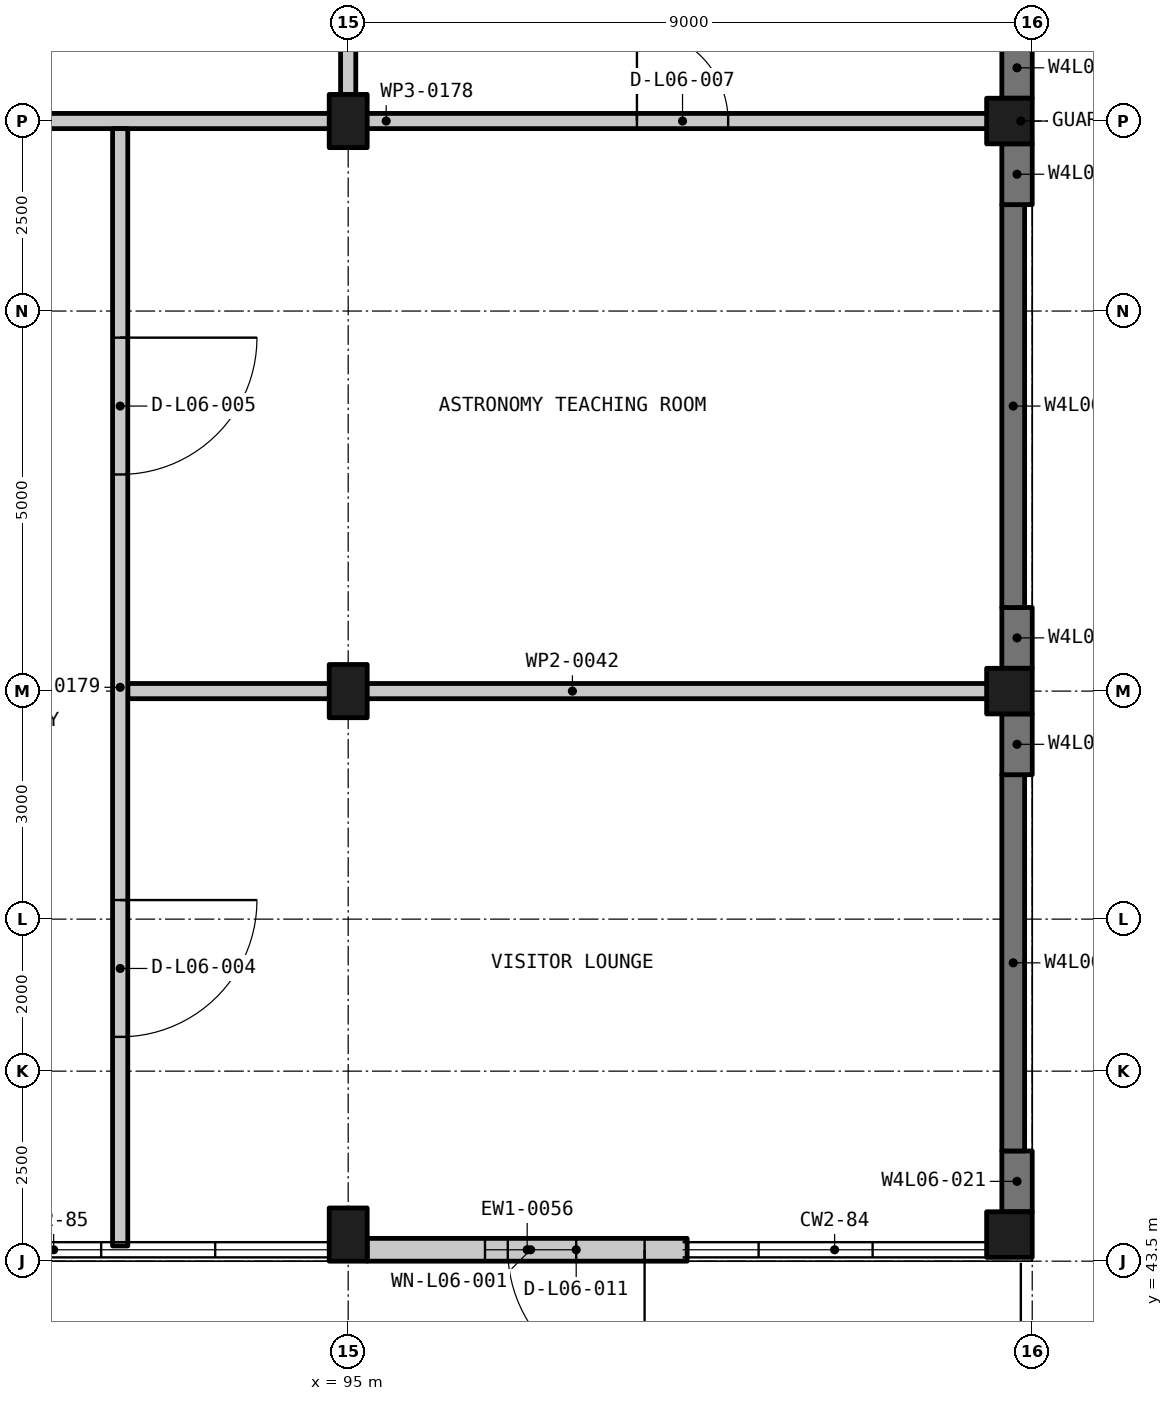
"""IFC4 building model, lengths in metres.
Left out: names, types, materials, properties, quantities, classifications, styles, units other than length and angle.
Written with IfcOpenShell. Run it as: python <this file> out.ifc"""

import sys

from ifc_helpers import new_model, si_unit, direction, frame, frame_2d, origin, origin_2d, place, context, subcontext, project, spatial, rectangle, extrude, element, fill, save


model = new_model("IFC4")
c1 = context("Model", 3, precision=1e-05, world=origin(), true_north=direction((0.0, 1.0)))
c2 = subcontext(c1, "Body", "Model", "MODEL_VIEW")
j1 = project(units=[si_unit("LENGTHUNIT", "METRE"), si_unit("PLANEANGLEUNIT", "RADIAN")], contexts=[c1])
p1 = place(None, origin())
s1 = spatial("IfcSite", under=j1, at=p1, CompositionType="ELEMENT")
p2 = place(p1, origin())
s2 = spatial("IfcBuilding", under=s1, at=p2, CompositionType="ELEMENT")
p3 = place(p2, frame((0.0, 0.0, 29.25)))
s3 = spatial("IfcBuildingStorey", under=s2, at=p3, CompositionType="ELEMENT", Elevation=29.25)
for number, where, z_axis, x_axis in (
    (1, (95.0, 43.85, -0.3), (0.0, 0.0, 1.0), (1.0, 0.0, 0.0)),
    (2, (95.0, 51.0, -0.3), (0.0, 0.0, 1.0), (1.0, 0.0, 0.0)),
    (3, (95.0, 58.5, -0.3), (0.0, 0.0, 1.0), (1.0, 0.0, 0.0)),
):
    element("IfcColumn", number, at=place(p3, frame(where, z_axis=z_axis, x_axis=x_axis)), inside=s3, PredefinedType="COLUMN", context=c2, shape_type="SweptSolid", body=[
        extrude(rectangle(XDim=0.5, YDim=0.7, at=origin_2d()), origin(), (0.0, 0.0, 1.0), 4.5),
    ])
for number, where, z_axis, x_axis in (
    (4, (103.7, 43.85, -0.3), (0.0, 0.0, 1.0), (1.0, 0.0, 0.0)),
    (5, (103.7, 51.0, -0.3), (0.0, 0.0, 1.0), (1.0, 0.0, 0.0)),
    (6, (103.7, 58.5, -0.3), (0.0, 0.0, 1.0), (1.0, 0.0, 0.0)),
):
    element("IfcColumn", number, at=place(p3, frame(where, z_axis=z_axis, x_axis=x_axis)), inside=s3, PredefinedType="COLUMN", context=c2, shape_type="SweptSolid", body=[
        extrude(rectangle(XDim=0.6, YDim=0.6, at=origin_2d()), origin(), (0.0, 0.0, 1.0), 4.5),
    ])
p4 = place(p3, frame((103.8, 44.15, -0.3), z_axis=(0.0, 0.0, 1.0), x_axis=(0.0, 1.0, 0.0)))
e7 = element("IfcWall", 7, at=p4, inside=s3, PredefinedType="SOLIDWALL", context=c2, shape_type="SweptSolid", body=[
    extrude(rectangle(XDim=0.8, YDim=0.4, at=frame_2d((0.4, 0.0))), origin(), (0.0, 0.0, 1.0), 4.5),
])
p5 = place(p3, frame((103.75, 44.95, -0.3), z_axis=(0.0, 0.0, 1.0), x_axis=(0.0, 1.0, 0.0)))
e8 = element("IfcWall", 8, at=p5, inside=s3, PredefinedType="SOLIDWALL", context=c2, shape_type="SweptSolid", body=[
    extrude(rectangle(XDim=4.95, YDim=0.3, at=frame_2d((2.475, 0.0))), origin(), (0.0, 0.0, 1.0), 4.5),
])
for number, where, z_axis, x_axis in (
    (9, (103.8, 49.9, -0.3), (0.0, 0.0, 1.0), (0.0, 1.0, 0.0)),
    (10, (103.8, 51.3, -0.3), (0.0, 0.0, 1.0), (0.0, 1.0, 0.0)),
):
    element("IfcWall", number, at=place(p3, frame(where, z_axis=z_axis, x_axis=x_axis)), inside=s3, PredefinedType="SOLIDWALL", context=c2, shape_type="SweptSolid", body=[
        extrude(rectangle(XDim=0.8, YDim=0.4, at=frame_2d((0.4, 0.0))), origin(), (0.0, 0.0, 1.0), 4.5),
    ])
p6 = place(p3, frame((103.75, 52.1, -0.3), z_axis=(0.0, 0.0, 1.0), x_axis=(0.0, 1.0, 0.0)))
e11 = element("IfcWall", 11, at=p6, inside=s3, PredefinedType="SOLIDWALL", context=c2, shape_type="SweptSolid", body=[
    extrude(rectangle(XDim=5.3, YDim=0.3, at=frame_2d((2.65, 0.0))), origin(), (0.0, 0.0, 1.0), 4.5),
])
for number, where, z_axis, x_axis in (
    (12, (103.8, 57.4, -0.3), (0.0, 0.0, 1.0), (0.0, 1.0, 0.0)),
    (13, (103.8, 58.8, -0.3), (0.0, 0.0, 1.0), (0.0, 1.0, 0.0)),
):
    element("IfcWall", number, at=place(p3, frame(where, z_axis=z_axis, x_axis=x_axis)), inside=s3, PredefinedType="SOLIDWALL", context=c2, shape_type="SweptSolid", body=[
        extrude(rectangle(XDim=0.8, YDim=0.4, at=frame_2d((0.4, 0.0))), origin(), (0.0, 0.0, 1.0), 4.5),
    ])
p7 = place(p3, frame((99.46, 43.65, 0.0), z_axis=(0.0, 0.0, 1.0), x_axis=(-1.0, 0.0, 0.0)))
e14 = element("IfcWall", 14, at=p7, inside=s3, PredefinedType="SOLIDWALL", context=c2, shape_type="SweptSolid", body=[
    extrude(rectangle(XDim=4.21, YDim=0.3, at=frame_2d((2.105, 0.0))), origin(), (0.0, 0.0, 1.0), 3.4),
])
p8 = place(p7, frame((0.56, 0.0, 0.0)))
e15 = element("IfcOpeningElement", 15, at=p8, cuts=e14, PredefinedType="OPENING", context=c2, shape_type="SweptSolid", body=[
    extrude(rectangle(XDim=1.8, YDim=2.2, at=frame_2d((0.9, 1.1))), frame((0.0, 0.16, 0.0), z_axis=(0.0, -1.0, 0.0), x_axis=(1.0, 0.0, 0.0)), (0.0, 0.0, 1.0), 0.32),
])
p9 = place(p7, frame((1.46, 0.0, 2.4)))
e16 = element("IfcOpeningElement", 16, at=p9, cuts=e14, PredefinedType="OPENING", context=c2, shape_type="SweptSolid", body=[
    extrude(rectangle(XDim=1.2, YDim=0.6, at=frame_2d((0.6, 0.3))), frame((0.0, 0.16, 0.0), z_axis=(0.0, -1.0, 0.0), x_axis=(1.0, 0.0, 0.0)), (0.0, 0.0, 1.0), 0.32),
])
p10 = place(p3, frame((92.1, 51.0, 0.0), z_axis=(0.0, 0.0, 1.0), x_axis=(1.0, 0.0, 0.0)))
e17 = element("IfcWall", 17, at=p10, inside=s3, PredefinedType="PARTITIONING", context=c2, shape_type="SweptSolid", body=[
    extrude(rectangle(XDim=11.7, YDim=0.2, at=frame_2d((5.85, 0.0))), origin(), (0.0, 0.0, 1.0), 3.3),
])
p11 = place(p3, frame((87.2, 58.5, 0.0), z_axis=(0.0, 0.0, 1.0), x_axis=(1.0, 0.0, 0.0)))
e18 = element("IfcWall", 18, at=p11, inside=s3, PredefinedType="PARTITIONING", context=c2, shape_type="SweptSolid", body=[
    extrude(rectangle(XDim=16.6, YDim=0.2, at=frame_2d((8.3, 0.0))), origin(), (0.0, 0.0, 1.0), 3.3),
])
p12 = place(p11, frame((1.8, 0.0, 0.0)))
e19 = element("IfcOpeningElement", 19, at=p12, cuts=e18, PredefinedType="OPENING", context=c2, shape_type="SweptSolid", body=[
    extrude(rectangle(XDim=1.2, YDim=2.1, at=frame_2d((0.6, 1.05))), frame((0.0, 0.11, 0.0), z_axis=(0.0, -1.0, 0.0), x_axis=(1.0, 0.0, 0.0)), (0.0, 0.0, 1.0), 0.22),
])
p13 = place(p11, frame((11.599, 0.0, 0.0)))
e20 = element("IfcOpeningElement", 20, at=p13, cuts=e18, PredefinedType="OPENING", context=c2, shape_type="SweptSolid", body=[
    extrude(rectangle(XDim=1.2, YDim=2.1, at=frame_2d((0.6, 1.05))), frame((0.0, 0.11, 0.0), z_axis=(0.0, -1.0, 0.0), x_axis=(1.0, 0.0, 0.0)), (0.0, 0.0, 1.0), 0.22),
])
p14 = place(p3, frame((95.0, 58.6, 0.0), z_axis=(0.0, 0.0, 1.0), x_axis=(0.0, 1.0, 0.0)))
e21 = element("IfcWall", 21, at=p14, inside=s3, PredefinedType="PARTITIONING", context=c2, shape_type="SweptSolid", body=[
    extrude(rectangle(XDim=14.7, YDim=0.2, at=frame_2d((7.35, 0.0))), origin(), (0.0, 0.0, 1.0), 3.4),
])
p15 = place(p14, frame((4.617, 0.0, 0.0)))
e22 = element("IfcOpeningElement", 22, at=p15, cuts=e21, PredefinedType="OPENING", context=c2, shape_type="SweptSolid", body=[
    extrude(rectangle(XDim=1.2, YDim=2.1, at=frame_2d((0.6, 1.05))), frame((0.0, 0.11, 0.0), z_axis=(0.0, -1.0, 0.0), x_axis=(1.0, 0.0, 0.0)), (0.0, 0.0, 1.0), 0.22),
])
p16 = place(p3, frame((92.0, 58.4, 0.0), z_axis=(0.0, 0.0, 1.0), x_axis=(0.0, -1.0, 0.0)))
e23 = element("IfcWall", 23, at=p16, inside=s3, PredefinedType="PARTITIONING", context=c2, shape_type="SweptSolid", body=[
    extrude(rectangle(XDim=14.7, YDim=0.2, at=frame_2d((7.35, 0.0))), origin(), (0.0, 0.0, 1.0), 3.3),
])
p17 = place(p16, frame((10.149, 0.0, 0.0)))
e24 = element("IfcOpeningElement", 24, at=p17, cuts=e23, PredefinedType="OPENING", context=c2, shape_type="SweptSolid", body=[
    extrude(rectangle(XDim=1.8, YDim=2.1, at=frame_2d((0.9, 1.05))), frame((0.0, 0.11, 0.0), z_axis=(0.0, -1.0, 0.0), x_axis=(1.0, 0.0, 0.0)), (0.0, 0.0, 1.0), 0.22),
])
p18 = place(p16, frame((2.75, 0.0, 0.0)))
e25 = element("IfcOpeningElement", 25, at=p18, cuts=e23, PredefinedType="OPENING", context=c2, shape_type="SweptSolid", body=[
    extrude(rectangle(XDim=1.8, YDim=2.1, at=frame_2d((0.9, 1.05))), frame((0.0, 0.11, 0.0), z_axis=(0.0, -1.0, 0.0), x_axis=(1.0, 0.0, 0.0)), (0.0, 0.0, 1.0), 0.22),
])
p19 = place(p8, origin())
e26 = element("IfcDoor", 26, at=p19, inside=s3, OperationType="SINGLE_SWING_LEFT", PredefinedType="DOOR", context=c2, shape_type="SweptSolid", body=[
    extrude(rectangle(XDim=1.8, YDim=2.2, at=frame_2d((0.9, 1.1))), frame((0.0, 0.025, 0.0), z_axis=(0.0, -1.0, 0.0), x_axis=(1.0, 0.0, 0.0)), (0.0, 0.0, 1.0), 0.05),
])
fill(e15, e26)
p20 = place(p9, origin())
e27 = element("IfcWindow", 27, at=p20, inside=s3, PartitioningType="SINGLE_PANEL", PredefinedType="WINDOW", context=c2, shape_type="SweptSolid", body=[
    extrude(rectangle(XDim=1.2, YDim=0.6, at=frame_2d((0.6, 0.3))), frame((0.0, 0.03, 0.0), z_axis=(0.0, -1.0, 0.0), x_axis=(1.0, 0.0, 0.0)), (0.0, 0.0, 1.0), 0.06),
])
fill(e16, e27)
p21 = place(p17, origin())
e28 = element("IfcDoor", 28, at=p21, inside=s3, OperationType="DOUBLE_DOOR_SINGLE_SWING", PredefinedType="DOOR", context=c2, shape_type="SweptSolid", body=[
    extrude(rectangle(XDim=1.8, YDim=2.1, at=frame_2d((0.9, 1.05))), frame((0.0, 0.025, 0.0), z_axis=(0.0, -1.0, 0.0), x_axis=(1.0, 0.0, 0.0)), (0.0, 0.0, 1.0), 0.05),
])
fill(e24, e28)
p22 = place(p18, origin())
e29 = element("IfcDoor", 29, at=p22, inside=s3, OperationType="DOUBLE_DOOR_SINGLE_SWING", PredefinedType="DOOR", context=c2, shape_type="SweptSolid", body=[
    extrude(rectangle(XDim=1.8, YDim=2.1, at=frame_2d((0.9, 1.05))), frame((0.0, 0.025, 0.0), z_axis=(0.0, -1.0, 0.0), x_axis=(1.0, 0.0, 0.0)), (0.0, 0.0, 1.0), 0.05),
])
fill(e25, e29)
p23 = place(p13, origin())
e30 = element("IfcDoor", 30, at=p23, inside=s3, OperationType="SINGLE_SWING_LEFT", PredefinedType="DOOR", context=c2, shape_type="SweptSolid", body=[
    extrude(rectangle(XDim=1.2, YDim=2.1, at=frame_2d((0.6, 1.05))), frame((0.0, 0.025, 0.0), z_axis=(0.0, -1.0, 0.0), x_axis=(1.0, 0.0, 0.0)), (0.0, 0.0, 1.0), 0.05),
])
fill(e20, e30)
save(model, sys.argv[1])
